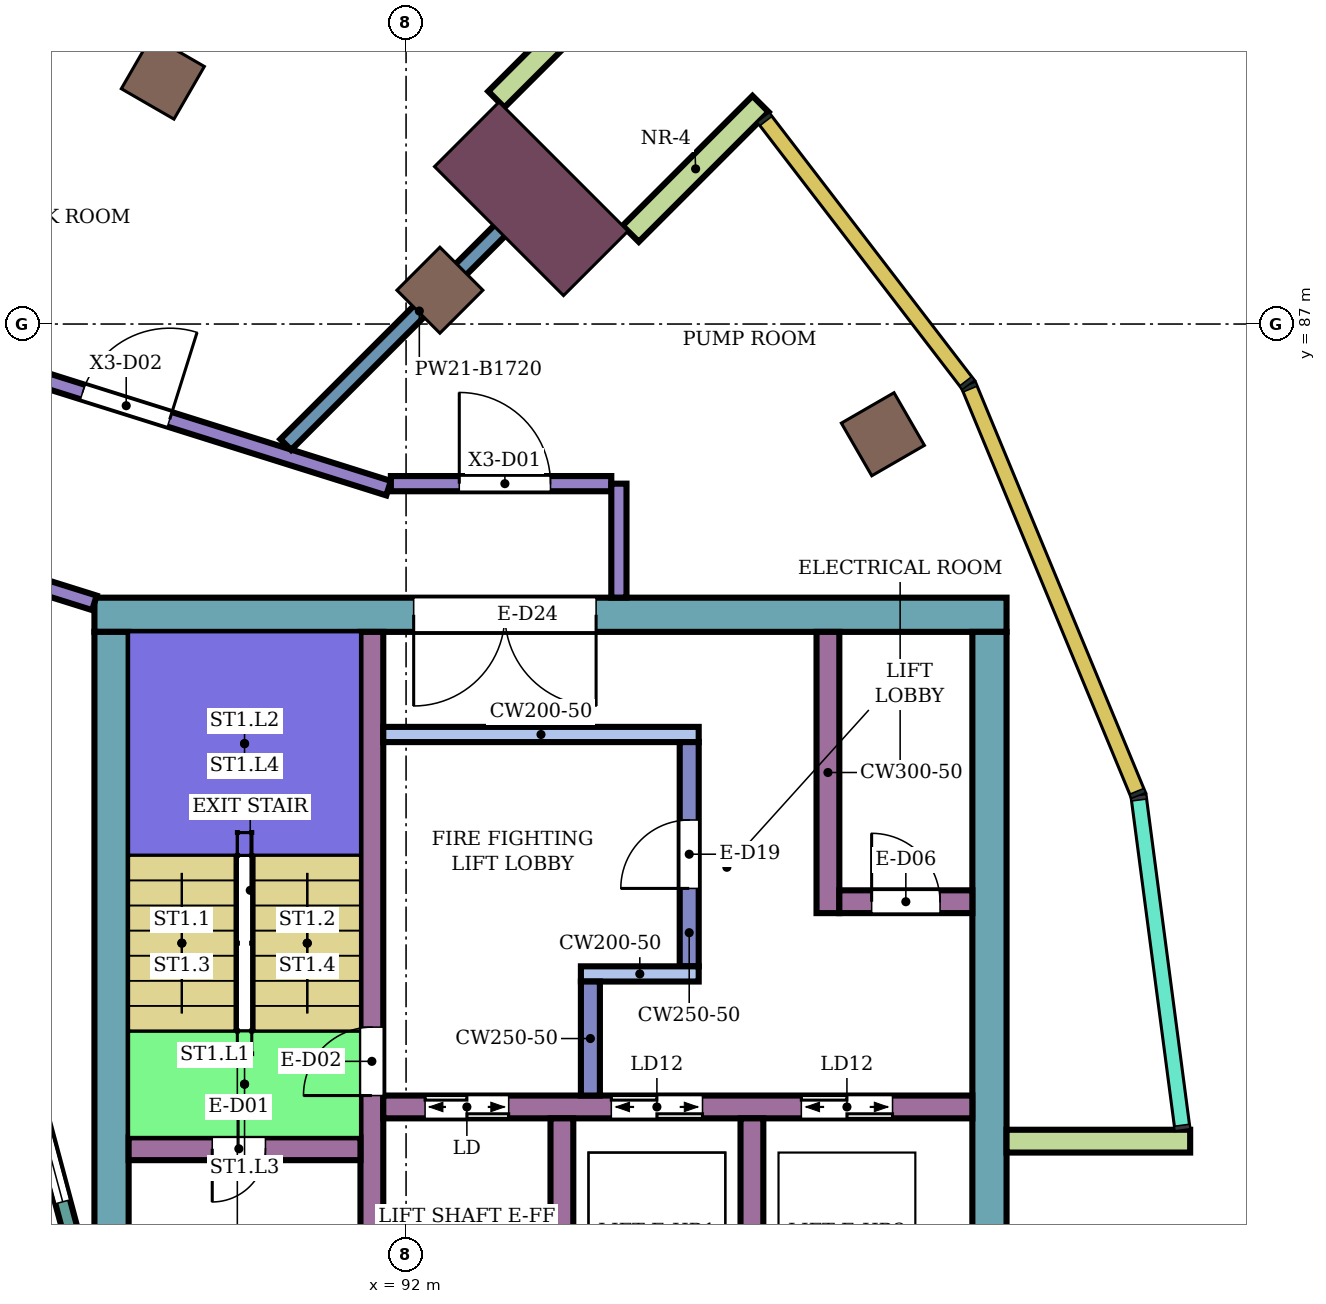
"""IFC4 building model, lengths in metres.
Left out: names, types, materials, properties, quantities, classifications, styles, units other than length and angle.
Written with IfcOpenShell. Run it as: python <this file> out.ifc"""

import sys

from ifc_helpers import new_model, si_unit, direction, frame, frame_2d, origin, origin_2d, place, context, subcontext, project, spatial, rectangle, extrude, element, fill, save


model = new_model("IFC4")
c1 = context("Model", 3, precision=1e-05, world=origin(), true_north=direction((0.0, 1.0)))
c2 = subcontext(c1, "Body", "Model", "MODEL_VIEW")
j1 = project(units=[si_unit("LENGTHUNIT", "METRE"), si_unit("PLANEANGLEUNIT", "RADIAN")], contexts=[c1])
p1 = place(None, origin())
s1 = spatial("IfcSite", under=j1, at=p1, CompositionType="ELEMENT")
p2 = place(p1, origin())
s2 = spatial("IfcBuilding", under=s1, at=p2, CompositionType="ELEMENT")
p3 = place(p2, frame((0.0, 0.0, 309.3)))
s3 = spatial("IfcBuildingStorey", under=s2, at=p3, CompositionType="ELEMENT", Elevation=309.3)
for number, where, z_axis, x_axis in (
    (1, (98.273, 85.55, 0.0), (0.0, 0.0, 1.0), (0.866, 0.5, 0.0)),
    (2, (92.445, 87.445, 0.0), (0.0, 0.0, 1.0), (0.707, 0.707, 0.0)),
    (3, (88.8, 90.242, 0.0), (0.0, 0.0, 1.0), (0.5, 0.866, 0.0)),
):
    element("IfcColumn", number, at=place(p3, frame(where, z_axis=z_axis, x_axis=x_axis)), inside=s3, PredefinedType="COLUMN", context=c2, shape_type="SweptSolid", body=[
        extrude(rectangle(XDim=0.8, YDim=0.8, at=origin_2d()), origin(), (0.0, 0.0, 1.0), 5.6),
    ])
p4 = place(p3, frame((93.647, 88.647, 0.0), z_axis=(0.0, 0.0, 1.0), x_axis=(0.707106781187, 0.707106781187, 0.0)))
e4 = element("IfcColumn", 4, at=p4, inside=s3, PredefinedType="COLUMN", context=c2, shape_type="SweptSolid", body=[
    extrude(rectangle(XDim=1.2, YDim=2.4, at=origin_2d()), origin(), (0.0, 0.0, 1.0), 5.6),
])
p5 = place(p3, frame((87.9, 83.175, 0.0), z_axis=(0.0, 0.0, 1.0), x_axis=(1.0, 0.0, 0.0)))
e5 = element("IfcWall", 5, at=p5, inside=s3, PredefinedType="SHEAR", context=c2, shape_type="SweptSolid", body=[
    extrude(rectangle(XDim=12.0, YDim=0.45, at=frame_2d((6.0, 0.0))), origin(), (0.0, 0.0, 1.0), 5.28),
])
p6 = place(p5, frame((4.2, 0.0, 0.0)))
e6 = element("IfcOpeningElement", 6, at=p6, cuts=e5, PredefinedType="OPENING", context=c2, shape_type="SweptSolid", body=[
    extrude(rectangle(XDim=2.4, YDim=2.4, at=frame_2d((1.2, 1.2))), frame((0.0, 0.235, 0.0), z_axis=(0.0, -1.0, 0.0), x_axis=(1.0, 0.0, 0.0)), (0.0, 0.0, 1.0), 0.47),
])
p7 = place(p3, frame((88.125, 75.0, 0.0), z_axis=(0.0, 0.0, 1.0), x_axis=(0.0, 1.0, 0.0)))
e7 = element("IfcWall", 7, at=p7, inside=s3, PredefinedType="SHEAR", context=c2, shape_type="SweptSolid", body=[
    extrude(rectangle(XDim=7.95, YDim=0.45, at=frame_2d((3.975, 0.0))), origin(), (0.0, 0.0, 1.0), 5.28),
])
p8 = place(p3, frame((99.675, 73.6, 0.0), z_axis=(0.0, 0.0, 1.0), x_axis=(0.0, 1.0, 0.0)))
e8 = element("IfcWall", 8, at=p8, inside=s3, PredefinedType="SHEAR", context=c2, shape_type="SweptSolid", body=[
    extrude(rectangle(XDim=9.35, YDim=0.45, at=frame_2d((4.675, 0.0))), origin(), (0.0, 0.0, 1.0), 5.28),
])
p9 = place(p3, frame((91.55, 75.0, 0.0), z_axis=(0.0, 0.0, 1.0), x_axis=(0.0, 1.0, 0.0)))
e9 = element("IfcWall", 9, at=p9, inside=s3, PredefinedType="SHEAR", context=c2, shape_type="SweptSolid", body=[
    extrude(rectangle(XDim=7.95, YDim=0.3, at=frame_2d((3.975, 0.0))), origin(), (0.0, 0.0, 1.0), 5.28),
])
p10 = place(p9, frame((1.85, 0.0, 0.0)))
e10 = element("IfcOpeningElement", 10, at=p10, cuts=e9, PredefinedType="OPENING", context=c2, shape_type="SweptSolid", body=[
    extrude(rectangle(XDim=0.9, YDim=2.1, at=frame_2d((0.45, 1.05))), frame((0.0, 0.16, 0.0), z_axis=(0.0, -1.0, 0.0), x_axis=(1.0, 0.0, 0.0)), (0.0, 0.0, 1.0), 0.32),
])
p11 = place(p3, frame((88.35, 76.15, 0.0), z_axis=(0.0, 0.0, 1.0), x_axis=(1.0, 0.0, 0.0)))
e11 = element("IfcWall", 11, at=p11, inside=s3, PredefinedType="SHEAR", context=c2, shape_type="SweptSolid", body=[
    extrude(rectangle(XDim=3.05, YDim=0.3, at=frame_2d((1.525, 0.0))), origin(), (0.0, 0.0, 1.0), 5.28),
])
p12 = place(p11, frame((1.1, 0.0, 0.0)))
e12 = element("IfcOpeningElement", 12, at=p12, cuts=e11, PredefinedType="OPENING", context=c2, shape_type="SweptSolid", body=[
    extrude(rectangle(XDim=0.7, YDim=2.0, at=frame_2d((0.35, 1.0))), frame((0.0, 0.16, 0.0), z_axis=(0.0, -1.0, 0.0), x_axis=(1.0, 0.0, 0.0)), (0.0, 0.0, 1.0), 0.32),
])
p13 = place(p3, frame((91.7, 76.7, 0.0), z_axis=(0.0, 0.0, 1.0), x_axis=(1.0, 0.0, 0.0)))
e13 = element("IfcWall", 13, at=p13, inside=s3, PredefinedType="SHEAR", context=c2, shape_type="SweptSolid", body=[
    extrude(rectangle(XDim=7.75, YDim=0.3, at=frame_2d((3.875, 0.0))), origin(), (0.0, 0.0, 1.0), 5.28),
])
p14 = place(p13, frame((0.55, 0.0, 0.0)))
e14 = element("IfcOpeningElement", 14, at=p14, cuts=e13, PredefinedType="OPENING", context=c2, shape_type="SweptSolid", body=[
    extrude(rectangle(XDim=1.1, YDim=2.1, at=frame_2d((0.55, 1.05))), frame((0.0, 0.16, 0.0), z_axis=(0.0, -1.0, 0.0), x_axis=(1.0, 0.0, 0.0)), (0.0, 0.0, 1.0), 0.32),
])
p15 = place(p13, frame((3.0, 0.0, 0.0)))
e15 = element("IfcOpeningElement", 15, at=p15, cuts=e13, PredefinedType="OPENING", context=c2, shape_type="SweptSolid", body=[
    extrude(rectangle(XDim=1.2, YDim=2.1, at=frame_2d((0.6, 1.05))), frame((0.0, 0.16, 0.0), z_axis=(0.0, -1.0, 0.0), x_axis=(1.0, 0.0, 0.0)), (0.0, 0.0, 1.0), 0.32),
])
p16 = place(p13, frame((5.5, 0.0, 0.0)))
e16 = element("IfcOpeningElement", 16, at=p16, cuts=e13, PredefinedType="OPENING", context=c2, shape_type="SweptSolid", body=[
    extrude(rectangle(XDim=1.2, YDim=2.1, at=frame_2d((0.6, 1.05))), frame((0.0, 0.16, 0.0), z_axis=(0.0, -1.0, 0.0), x_axis=(1.0, 0.0, 0.0)), (0.0, 0.0, 1.0), 0.32),
])
for number, where, z_axis, x_axis in (
    (17, (94.05, 74.0, 0.0), (0.0, 0.0, 1.0), (0.0, 1.0, 0.0)),
    (18, (96.55, 74.0, 0.0), (0.0, 0.0, 1.0), (0.0, 1.0, 0.0)),
):
    element("IfcWall", number, at=place(p3, frame(where, z_axis=z_axis, x_axis=x_axis)), inside=s3, PredefinedType="SHEAR", context=c2, shape_type="SweptSolid", body=[
        extrude(rectangle(XDim=2.55, YDim=0.3, at=frame_2d((1.275, 0.0))), origin(), (0.0, 0.0, 1.0), 5.28),
    ])
p17 = place(p3, frame((91.7, 81.6, 0.0), z_axis=(0.0, 0.0, 1.0), x_axis=(1.0, 0.0, 0.0)))
e19 = element("IfcWall", 19, at=p17, inside=s3, PredefinedType="SHEAR", context=c2, shape_type="SweptSolid", body=[
    extrude(rectangle(XDim=4.15, YDim=0.2, at=frame_2d((2.075, 0.0))), origin(), (0.0, 0.0, 1.0), 5.28),
])
p18 = place(p3, frame((95.725, 78.55, 0.0), z_axis=(0.0, 0.0, 1.0), x_axis=(0.0, 1.0, 0.0)))
e20 = element("IfcWall", 20, at=p18, inside=s3, PredefinedType="SHEAR", context=c2, shape_type="SweptSolid", body=[
    extrude(rectangle(XDim=2.95, YDim=0.25, at=frame_2d((1.475, 0.0))), origin(), (0.0, 0.0, 1.0), 5.28),
])
p19 = place(p18, frame((1.025, 0.0, 0.0)))
e21 = element("IfcOpeningElement", 21, at=p19, cuts=e20, PredefinedType="OPENING", context=c2, shape_type="SweptSolid", body=[
    extrude(rectangle(XDim=0.9, YDim=2.1, at=frame_2d((0.45, 1.05))), frame((0.0, 0.135, 0.0), z_axis=(0.0, -1.0, 0.0), x_axis=(1.0, 0.0, 0.0)), (0.0, 0.0, 1.0), 0.27),
])
p20 = place(p3, frame((94.3, 78.45, 0.0), z_axis=(0.0, 0.0, 1.0), x_axis=(1.0, 0.0, 0.0)))
e22 = element("IfcWall", 22, at=p20, inside=s3, PredefinedType="SHEAR", context=c2, shape_type="SweptSolid", body=[
    extrude(rectangle(XDim=1.55, YDim=0.2, at=frame_2d((0.775, 0.0))), origin(), (0.0, 0.0, 1.0), 5.28),
])
p21 = place(p3, frame((94.425, 76.85, 0.0), z_axis=(0.0, 0.0, 1.0), x_axis=(0.0, 1.0, 0.0)))
e23 = element("IfcWall", 23, at=p21, inside=s3, PredefinedType="SHEAR", context=c2, shape_type="SweptSolid", body=[
    extrude(rectangle(XDim=1.5, YDim=0.25, at=frame_2d((0.75, 0.0))), origin(), (0.0, 0.0, 1.0), 5.28),
])
p22 = place(p3, frame((97.55, 79.25, 0.0), z_axis=(0.0, 0.0, 1.0), x_axis=(0.0, 1.0, 0.0)))
e24 = element("IfcWall", 24, at=p22, inside=s3, PredefinedType="SHEAR", context=c2, shape_type="SweptSolid", body=[
    extrude(rectangle(XDim=3.7, YDim=0.3, at=frame_2d((1.85, 0.0))), origin(), (0.0, 0.0, 1.0), 5.28),
])
p23 = place(p3, frame((97.7, 79.4, 0.0), z_axis=(0.0, 0.0, 1.0), x_axis=(1.0, 0.0, 0.0)))
e25 = element("IfcWall", 25, at=p23, inside=s3, PredefinedType="SHEAR", context=c2, shape_type="SweptSolid", body=[
    extrude(rectangle(XDim=1.75, YDim=0.3, at=frame_2d((0.875, 0.0))), origin(), (0.0, 0.0, 1.0), 5.28),
])
p24 = place(p23, frame((0.425, 0.0, 0.0)))
e26 = element("IfcOpeningElement", 26, at=p24, cuts=e25, PredefinedType="OPENING", context=c2, shape_type="SweptSolid", body=[
    extrude(rectangle(XDim=0.9, YDim=2.1, at=frame_2d((0.45, 1.05))), frame((0.0, 0.16, 0.0), z_axis=(0.0, -1.0, 0.0), x_axis=(1.0, 0.0, 0.0)), (0.0, 0.0, 1.0), 0.32),
])
for number, where, z_axis, x_axis in (
    (27, (99.9, 76.25, 0.0), (0.0, 0.0, 1.0), (1.0, 0.0, 0.0)),
    (28, (94.955, 88.188, 0.0), (0.0, 0.0, 1.0), (0.707, 0.707, 0.0)),
    (29, (93.188, 89.955, 0.0), (0.0, 0.0, 1.0), (0.707, 0.707, 0.0)),
):
    element("IfcWall", number, at=place(p3, frame(where, z_axis=z_axis, x_axis=x_axis)), inside=s3, PredefinedType="NOTDEFINED", context=c2, shape_type="SweptSolid", body=[
        extrude(rectangle(XDim=2.416, YDim=0.3, at=frame_2d((1.208, 0.0))), origin(), (0.0, 0.0, 1.0), 5.6),
    ])
p25 = place(p3, frame((87.604, 75.0, 0.0), z_axis=(0.0, 0.0, 1.0), x_axis=(-0.258789828301, 0.965933654434, 0.0)))
e30 = element("IfcWall", 30, at=p25, inside=s3, PredefinedType="NOTDEFINED", context=c2, shape_type="SweptSolid", body=[
    extrude(rectangle(XDim=3.936, YDim=0.2, at=frame_2d((1.968, 0.0))), origin(), (0.0, 0.0, 1.0), 5.6),
])
p26 = place(p25, frame((0.468, 0.0, 0.9)))
e31 = element("IfcOpeningElement", 31, at=p26, cuts=e30, PredefinedType="OPENING", context=c2, shape_type="SweptSolid", body=[
    extrude(rectangle(XDim=3.0, YDim=2.3, at=frame_2d((1.5, 1.15))), frame((0.0, 0.11, 0.0), z_axis=(0.0, -1.0, 0.0), x_axis=(1.0, 0.0, 0.0)), (0.0, 0.0, 1.0), 0.22),
])
p27 = place(p3, frame((85.587, 84.057, 0.0), z_axis=(0.0, 0.0, 1.0), x_axis=(0.954239513179, -0.299043393987, 0.0)))
e32 = element("IfcWall", 32, at=p27, inside=s3, PredefinedType="PARTITIONING", context=c2, shape_type="SweptSolid", body=[
    extrude(rectangle(XDim=2.424, YDim=0.2, at=frame_2d((1.212, 0.0))), origin(), (0.0, 0.0, 1.0), 5.15),
])
p28 = place(p27, frame((0.612, 0.0, 0.0)))
e33 = element("IfcOpeningElement", 33, at=p28, cuts=e32, PredefinedType="OPENING", context=c2, shape_type="SweptSolid", body=[
    extrude(rectangle(XDim=1.2, YDim=2.4, at=frame_2d((0.6, 1.2))), frame((0.0, 0.11, 0.0), z_axis=(0.0, -1.0, 0.0), x_axis=(1.0, 0.0, 0.0)), (0.0, 0.0, 1.0), 0.22),
])
p29 = place(p3, frame((86.313, 86.556, 0.0), z_axis=(0.0, 0.0, 1.0), x_axis=(0.95397278515, -0.299893189641, 0.0)))
e34 = element("IfcWall", 34, at=p29, inside=s3, PredefinedType="PARTITIONING", context=c2, shape_type="SweptSolid", body=[
    extrude(rectangle(XDim=5.72, YDim=0.2, at=frame_2d((2.86, 0.0))), origin(), (0.0, 0.0, 1.0), 5.15),
])
p30 = place(p29, frame((1.501, 0.0, 0.0)))
e35 = element("IfcOpeningElement", 35, at=p30, cuts=e34, PredefinedType="OPENING", context=c2, shape_type="SweptSolid", body=[
    extrude(rectangle(XDim=1.2, YDim=2.4, at=frame_2d((0.6, 1.2))), frame((0.0, 0.11, 0.0), z_axis=(0.0, -1.0, 0.0), x_axis=(1.0, 0.0, 0.0)), (0.0, 0.0, 1.0), 0.22),
])
p31 = place(p3, frame((90.417, 85.414, 0.0), z_axis=(0.0, 0.0, 1.0), x_axis=(0.707205024573, 0.707008524149, 0.0)))
e36 = element("IfcWall", 36, at=p31, inside=s3, PredefinedType="PARTITIONING", context=c2, shape_type="SweptSolid", body=[
    extrude(rectangle(XDim=4.97, YDim=0.2, at=frame_2d((2.485, 0.0))), origin(), (0.0, 0.0, 1.0), 3.88),
])
p32 = place(p3, frame((91.8, 84.9, 0.0), z_axis=(0.0, 0.0, 1.0), x_axis=(1.0, 0.0, 0.0)))
e37 = element("IfcWall", 37, at=p32, inside=s3, PredefinedType="PARTITIONING", context=c2, shape_type="SweptSolid", body=[
    extrude(rectangle(XDim=2.9, YDim=0.2, at=frame_2d((1.45, 0.0))), origin(), (0.0, 0.0, 1.0), 5.15),
])
p33 = place(p32, frame((0.9, 0.0, 0.0)))
e38 = element("IfcOpeningElement", 38, at=p33, cuts=e37, PredefinedType="OPENING", context=c2, shape_type="SweptSolid", body=[
    extrude(rectangle(XDim=1.2, YDim=2.4, at=frame_2d((0.6, 1.2))), frame((0.0, 0.11, 0.0), z_axis=(0.0, -1.0, 0.0), x_axis=(1.0, 0.0, 0.0)), (0.0, 0.0, 1.0), 0.22),
])
p34 = place(p3, frame((94.8, 83.401, 0.0), z_axis=(0.0, 0.0, 1.0), x_axis=(0.0, 1.0, 0.0)))
e39 = element("IfcWall", 39, at=p34, inside=s3, PredefinedType="PARTITIONING", context=c2, shape_type="SweptSolid", body=[
    extrude(rectangle(XDim=1.499, YDim=0.2, at=frame_2d((0.75, 0.0))), origin(), (0.0, 0.0, 1.0), 5.15),
])
p35 = place(p26, origin())
e40 = element("IfcWindow", 40, at=p35, inside=s3, PartitioningType="SINGLE_PANEL", PredefinedType="WINDOW", context=c2, shape_type="SweptSolid", body=[
    extrude(rectangle(XDim=3.0, YDim=2.3, at=frame_2d((1.5, 1.15))), frame((0.0, 0.03, 0.0), z_axis=(0.0, -1.0, 0.0), x_axis=(1.0, 0.0, 0.0)), (0.0, 0.0, 1.0), 0.06),
])
fill(e31, e40)
p36 = place(p33, origin())
e41 = element("IfcDoor", 41, at=p36, inside=s3, OperationType="SINGLE_SWING_LEFT", PredefinedType="DOOR", context=c2, shape_type="SweptSolid", body=[
    extrude(rectangle(XDim=1.2, YDim=2.4, at=frame_2d((0.6, 1.2))), frame((0.0, 0.025, 0.0), z_axis=(0.0, -1.0, 0.0), x_axis=(1.0, 0.0, 0.0)), (0.0, 0.0, 1.0), 0.05),
])
fill(e38, e41)
p37 = place(p30, origin())
e42 = element("IfcDoor", 42, at=p37, inside=s3, OperationType="SINGLE_SWING_RIGHT", PredefinedType="DOOR", context=c2, shape_type="SweptSolid", body=[
    extrude(rectangle(XDim=1.2, YDim=2.4, at=frame_2d((0.6, 1.2))), frame((0.0, 0.025, 0.0), z_axis=(0.0, -1.0, 0.0), x_axis=(1.0, 0.0, 0.0)), (0.0, 0.0, 1.0), 0.05),
])
fill(e35, e42)
p38 = place(p12, frame((0.7, 0.0, 0.0), z_axis=(0.0, 0.0, 1.0), x_axis=(-1.0, 0.0, 0.0)))
e43 = element("IfcDoor", 43, at=p38, inside=s3, OperationType="SINGLE_SWING_RIGHT", PredefinedType="DOOR", context=c2, shape_type="SweptSolid", body=[
    extrude(rectangle(XDim=0.7, YDim=2.0, at=frame_2d((0.35, 1.0))), frame((0.0, 0.025, 0.0), z_axis=(0.0, -1.0, 0.0), x_axis=(1.0, 0.0, 0.0)), (0.0, 0.0, 1.0), 0.05),
])
fill(e12, e43)
p39 = place(p10, origin())
e44 = element("IfcDoor", 44, at=p39, inside=s3, OperationType="SINGLE_SWING_LEFT", PredefinedType="DOOR", context=c2, shape_type="SweptSolid", body=[
    extrude(rectangle(XDim=0.9, YDim=2.1, at=frame_2d((0.45, 1.05))), frame((0.0, 0.025, 0.0), z_axis=(0.0, -1.0, 0.0), x_axis=(1.0, 0.0, 0.0)), (0.0, 0.0, 1.0), 0.05),
])
fill(e10, e44)
p40 = place(p14, origin())
e45 = element("IfcDoor", 45, at=p40, inside=s3, OperationType="DOUBLE_DOOR_SLIDING", PredefinedType="DOOR", context=c2, shape_type="SweptSolid", body=[
    extrude(rectangle(XDim=1.1, YDim=2.1, at=frame_2d((0.55, 1.05))), frame((0.0, 0.025, 0.0), z_axis=(0.0, -1.0, 0.0), x_axis=(1.0, 0.0, 0.0)), (0.0, 0.0, 1.0), 0.05),
])
fill(e14, e45)
p41 = place(p15, origin())
e46 = element("IfcDoor", 46, at=p41, inside=s3, OperationType="DOUBLE_DOOR_SLIDING", PredefinedType="DOOR", context=c2, shape_type="SweptSolid", body=[
    extrude(rectangle(XDim=1.2, YDim=2.1, at=frame_2d((0.6, 1.05))), frame((0.0, 0.025, 0.0), z_axis=(0.0, -1.0, 0.0), x_axis=(1.0, 0.0, 0.0)), (0.0, 0.0, 1.0), 0.05),
])
fill(e15, e46)
p42 = place(p16, origin())
e47 = element("IfcDoor", 47, at=p42, inside=s3, OperationType="DOUBLE_DOOR_SLIDING", PredefinedType="DOOR", context=c2, shape_type="SweptSolid", body=[
    extrude(rectangle(XDim=1.2, YDim=2.1, at=frame_2d((0.6, 1.05))), frame((0.0, 0.025, 0.0), z_axis=(0.0, -1.0, 0.0), x_axis=(1.0, 0.0, 0.0)), (0.0, 0.0, 1.0), 0.05),
])
fill(e16, e47)
p43 = place(p19, origin())
e48 = element("IfcDoor", 48, at=p43, inside=s3, OperationType="SINGLE_SWING_LEFT", PredefinedType="DOOR", context=c2, shape_type="SweptSolid", body=[
    extrude(rectangle(XDim=0.9, YDim=2.1, at=frame_2d((0.45, 1.05))), frame((0.0, 0.025, 0.0), z_axis=(0.0, -1.0, 0.0), x_axis=(1.0, 0.0, 0.0)), (0.0, 0.0, 1.0), 0.05),
])
fill(e21, e48)
p44 = place(p24, origin())
e49 = element("IfcDoor", 49, at=p44, inside=s3, OperationType="SINGLE_SWING_LEFT", PredefinedType="DOOR", context=c2, shape_type="SweptSolid", body=[
    extrude(rectangle(XDim=0.9, YDim=2.1, at=frame_2d((0.45, 1.05))), frame((0.0, 0.025, 0.0), z_axis=(0.0, -1.0, 0.0), x_axis=(1.0, 0.0, 0.0)), (0.0, 0.0, 1.0), 0.05),
])
fill(e26, e49)
p45 = place(p6, frame((2.4, 0.0, 0.0), z_axis=(0.0, 0.0, 1.0), x_axis=(-1.0, 0.0, 0.0)))
e50 = element("IfcDoor", 50, at=p45, inside=s3, OperationType="DOUBLE_DOOR_SINGLE_SWING", PredefinedType="DOOR", context=c2, shape_type="SweptSolid", body=[
    extrude(rectangle(XDim=2.4, YDim=2.4, at=frame_2d((1.2, 1.2))), frame((0.0, 0.025, 0.0), z_axis=(0.0, -1.0, 0.0), x_axis=(1.0, 0.0, 0.0)), (0.0, 0.0, 1.0), 0.05),
])
fill(e6, e50)
save(model, sys.argv[1])
